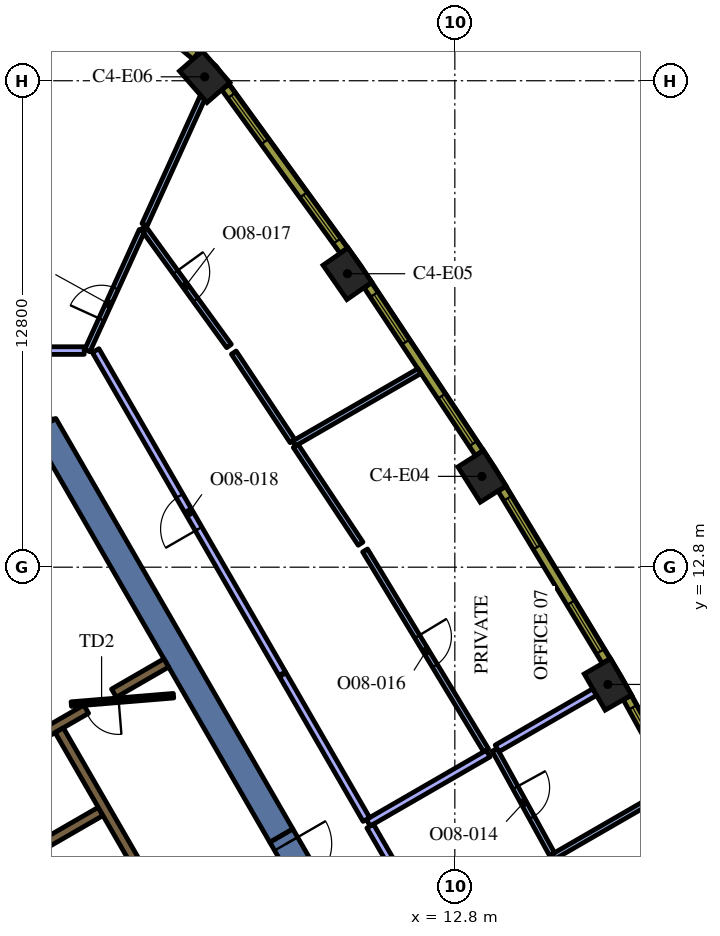
"""IFC4 building model, lengths in metres.
Left out: names, types, materials, properties, quantities, classifications, styles, units other than length and angle.
Written with IfcOpenShell. Run it as: python <this file> out.ifc"""

import sys

from ifc_helpers import new_model, si_unit, direction, frame, frame_2d, origin, origin_2d, place, context, subcontext, project, spatial, polyline, rectangle, outline, extrude, element, fill, save


model = new_model("IFC4")
c1 = context("Model", 3, precision=1e-05, world=origin(), true_north=direction((0.0, 1.0)))
c2 = subcontext(c1, "Body", "Model", "MODEL_VIEW")
j1 = project(units=[si_unit("LENGTHUNIT", "METRE"), si_unit("PLANEANGLEUNIT", "RADIAN")], contexts=[c1])
p1 = place(None, origin())
s1 = spatial("IfcSite", under=j1, at=p1, CompositionType="ELEMENT")
p2 = place(p1, origin())
s2 = spatial("IfcBuilding", under=s1, at=p2, CompositionType="ELEMENT")
p3 = place(p2, frame((0.0, 0.0, 235.2)))
s3 = spatial("IfcBuildingStorey", under=s2, at=p3, CompositionType="ELEMENT", Elevation=235.2)
for number, where, z_axis, x_axis in (
    (1, (16.827, 9.715, 0.0), (0.0, 0.0, 1.0), (-0.5, 0.866, 0.0)),
    (2, (13.513, 15.19, 0.0), (0.0, 0.0, 1.0), (-0.536, 0.845, 0.0)),
    (3, (9.975, 20.522, 0.0), (0.0, 0.0, 1.0), (-0.57, 0.822, 0.0)),
    (4, (6.219, 25.703, 0.0), (0.0, 0.0, 1.0), (-0.657, 0.754, 0.0)),
):
    element("IfcColumn", number, at=place(p3, frame(where, z_axis=z_axis, x_axis=x_axis)), inside=s3, PredefinedType="COLUMN", context=c2, shape_type="SweptSolid", body=[
        extrude(rectangle(XDim=1.1, YDim=0.8, at=origin_2d()), origin(), (0.0, 0.0, 1.0), 4.2),
    ])
p4 = place(p3, frame((8.235, 5.736, 0.0), z_axis=(0.0, 0.0, 1.0), x_axis=(-0.499983401189, 0.8660349869, 0.0)))
e5 = element("IfcWall", 5, at=p4, inside=s3, PredefinedType="SOLIDWALL", context=c2, shape_type="SweptSolid", body=[
    extrude(rectangle(XDim=12.472, YDim=0.7, at=frame_2d((6.236, 0.0))), origin(), (0.0, 0.0, 1.0), 4.2),
])
p5 = place(p3, origin())
e6 = element("IfcWall", 6, at=p5, inside=s3, PredefinedType="SOLIDWALL", context=c2, shape_type="SweptSolid", body=[
    extrude(outline(polyline([(1.501, 16.7), (2.277, 16.7), (1.695, 16.364), (1.501, 16.7)])), origin(), (0.0, 0.0, 1.0), 4.2),
])
p6 = place(p3, frame((6.568, -3.627, 0.0), z_axis=(0.0, 0.0, 1.0), x_axis=(-0.499999455981, 0.866025717874, 0.0)))
e7 = element("IfcWall", 7, at=p6, inside=s3, PredefinedType="SOLIDWALL", context=c2, shape_type="SweptSolid", body=[
    extrude(rectangle(XDim=11.978, YDim=0.25, at=frame_2d((5.989, 0.0))), origin(), (0.0, 0.0, 1.0), 4.2),
])
p7 = place(p3, frame((3.1, 9.064, 0.0), z_axis=(0.0, 0.0, 1.0), x_axis=(-0.866030133475, -0.499991807846, 0.0)))
e8 = element("IfcWall", 8, at=p7, inside=s3, PredefinedType="SOLIDWALL", context=c2, shape_type="SweptSolid", body=[
    extrude(rectangle(XDim=3.217, YDim=0.25, at=frame_2d((1.608, 0.0))), origin(), (0.0, 0.0, 1.0), 4.2),
])
p8 = place(p3, frame((1.574, 5.274, 0.0), z_axis=(0.0, 0.0, 1.0), x_axis=(0.866028486751, 0.499994660107, 0.0)))
e9 = element("IfcWall", 9, at=p8, inside=s3, PredefinedType="SOLIDWALL", context=c2, shape_type="SweptSolid", body=[
    extrude(rectangle(XDim=2.2, YDim=0.25, at=frame_2d((1.1, 0.0))), origin(), (0.0, 0.0, 1.0), 4.2),
])
p9 = place(p3, frame((3.83, 9.486, 0.0), z_axis=(0.0, 0.0, 1.0), x_axis=(0.865986202621, 0.500067892261, 0.0)))
e10 = element("IfcWall", 10, at=p9, inside=s3, PredefinedType="SOLIDWALL", context=c2, shape_type="SweptSolid", body=[
    extrude(rectangle(XDim=1.591, YDim=0.25, at=frame_2d((0.795, 0.0))), origin(), (0.0, 0.0, 1.0), 4.2),
])
p10 = place(p3, frame((8.565, -2.185, 0.0), z_axis=(0.0, 0.0, 1.0), x_axis=(-0.499997954832, 0.866026584559, 0.0)))
e11 = element("IfcWall", 11, at=p10, inside=s3, PredefinedType="SOLIDWALL", context=c2, shape_type="SweptSolid", body=[
    extrude(rectangle(XDim=12.35, YDim=0.25, at=frame_2d((6.175, 0.0))), origin(), (0.0, 0.0, 1.0), 4.2),
])
p11 = place(p10, frame((0.585, 0.0, 0.0)))
e12 = element("IfcOpeningElement", 12, at=p11, cuts=e11, PredefinedType="OPENING", context=c2, shape_type="SweptSolid", body=[
    extrude(rectangle(XDim=1.1, YDim=2.1, at=frame_2d((0.55, 1.05))), frame((0.0, 0.135, 0.0), z_axis=(0.0, -1.0, 0.0), x_axis=(1.0, 0.0, 0.0)), (0.0, 0.0, 1.0), 0.27),
])
p12 = place(p3, frame((5.398, 9.419, 0.0), z_axis=(0.0, 0.0, 1.0), x_axis=(-0.996653416376, -0.081743303248, 0.0)))
e13 = element("IfcWall", 13, at=p12, inside=s3, PredefinedType="PARTITIONING", context=c2, shape_type="SweptSolid", body=[
    extrude(rectangle(XDim=2.7, YDim=0.12, at=frame_2d((1.35, 0.0))), origin(), (0.0, 0.0, 1.0), 3.45),
])
p13 = place(p12, frame((1.45, 0.0, 0.0)))
e14 = element("IfcOpeningElement", 14, at=p13, cuts=e13, PredefinedType="OPENING", context=c2, shape_type="SweptSolid", body=[
    extrude(rectangle(XDim=0.9, YDim=2.1, at=frame_2d((0.45, 1.05))), frame((0.0, 0.07, 0.0), z_axis=(0.0, -1.0, 0.0), x_axis=(1.0, 0.0, 0.0)), (0.0, 0.0, 1.0), 0.14),
])
p14 = place(p3, frame((8.235, 5.736, 0.0), z_axis=(0.0, 0.0, 1.0), x_axis=(0.499954529098, -0.86605165483, 0.0)))
e15 = element("IfcWall", 15, at=p14, inside=s3, PredefinedType="SOLIDWALL", context=c2, shape_type="SweptSolid", body=[
    extrude(rectangle(XDim=1.7, YDim=0.7, at=frame_2d((0.85, 0.0))), origin(), (0.0, 0.0, 1.0), 4.2),
])
p15 = place(p14, frame((0.25, 0.0, 0.0)))
e16 = element("IfcOpeningElement", 16, at=p15, cuts=e15, PredefinedType="OPENING", context=c2, shape_type="SweptSolid", body=[
    extrude(rectangle(XDim=1.2, YDim=2.1, at=frame_2d((0.6, 1.05))), frame((0.0, 0.36, 0.0), z_axis=(0.0, -1.0, 0.0), x_axis=(1.0, 0.0, 0.0)), (0.0, 0.0, 1.0), 0.72),
])
p16 = place(p3, frame((15.394, 5.183, 0.0), z_axis=(0.0, 0.0, 1.0), x_axis=(0.866039935929, 0.499974828743, 0.0)))
e17 = element("IfcWall", 17, at=p16, inside=s3, PredefinedType="PARTITIONING", context=c2, shape_type="SweptSolid", body=[
    extrude(rectangle(XDim=3.601, YDim=0.15, at=frame_2d((1.8, 0.0))), origin(), (0.0, 0.0, 1.0), 3.45),
])
p17 = place(p3, frame((13.848, 7.995, 0.0), z_axis=(0.0, 0.0, 1.0), x_axis=(0.481894826099, -0.876229066272, 0.0)))
e18 = element("IfcWall", 18, at=p17, inside=s3, PredefinedType="PARTITIONING", context=c2, shape_type="SweptSolid", body=[
    extrude(rectangle(XDim=3.134, YDim=0.15, at=frame_2d((1.567, 0.0))), origin(), (0.0, 0.0, 1.0), 3.45),
])
p18 = place(p17, frame((1.134, 0.0, 0.0)))
e19 = element("IfcOpeningElement", 19, at=p18, cuts=e18, PredefinedType="OPENING", context=c2, shape_type="SweptSolid", body=[
    extrude(rectangle(XDim=0.9, YDim=2.1, at=frame_2d((0.45, 1.05))), frame((0.0, 0.085, 0.0), z_axis=(0.0, -1.0, 0.0), x_axis=(1.0, 0.0, 0.0)), (0.0, 0.0, 1.0), 0.17),
])
p19 = place(p3, frame((13.913, 8.032, 0.0), z_axis=(0.0, 0.0, 1.0), x_axis=(0.866015594979, 0.500016988964, 0.0)))
e20 = element("IfcWall", 20, at=p19, inside=s3, PredefinedType="PARTITIONING", context=c2, shape_type="SweptSolid", body=[
    extrude(rectangle(XDim=2.966, YDim=0.2, at=frame_2d((1.483, 0.0))), origin(), (0.0, 0.0, 1.0), 3.45),
])
p20 = place(p3, frame((10.522, 6.075, 0.0), z_axis=(0.0, 0.0, 1.0), x_axis=(0.866003708037, 0.500037576254, 0.0)))
e21 = element("IfcWall", 21, at=p20, inside=s3, PredefinedType="PARTITIONING", context=c2, shape_type="SweptSolid", body=[
    extrude(rectangle(XDim=3.644, YDim=0.2, at=frame_2d((1.822, 0.0))), origin(), (0.0, 0.0, 1.0), 3.45),
])
p21 = place(p3, frame((12.772, 2.178, 0.0), z_axis=(0.0, 0.0, 1.0), x_axis=(-0.50001224981, 0.866018331238, 0.0)))
e22 = element("IfcWall", 22, at=p21, inside=s3, PredefinedType="PARTITIONING", context=c2, shape_type="SweptSolid", body=[
    extrude(rectangle(XDim=4.4, YDim=0.2, at=frame_2d((2.2, 0.0))), origin(), (0.0, 0.0, 1.0), 3.45),
])
p22 = place(p3, frame((8.57, 16.056, 0.0), z_axis=(0.0, 0.0, 1.0), x_axis=(0.866000839906, 0.500042543472, 0.0)))
e23 = element("IfcWall", 23, at=p22, inside=s3, PredefinedType="PARTITIONING", context=c2, shape_type="SweptSolid", body=[
    extrude(rectangle(XDim=3.807, YDim=0.15, at=frame_2d((1.904, 0.0))), origin(), (0.0, 0.0, 1.0), 3.45),
])
p23 = place(p3, frame((10.439, 13.24, 0.0), z_axis=(0.0, 0.0, 1.0), x_axis=(0.517837859082, -0.855478785068, 0.0)))
e24 = element("IfcWall", 24, at=p23, inside=s3, PredefinedType="PARTITIONING", context=c2, shape_type="SweptSolid", body=[
    extrude(rectangle(XDim=6.148, YDim=0.15, at=frame_2d((3.074, 0.0))), origin(), (0.0, 0.0, 1.0), 3.45),
])
p24 = place(p23, frame((2.648, 0.0, 0.0)))
e25 = element("IfcOpeningElement", 25, at=p24, cuts=e24, PredefinedType="OPENING", context=c2, shape_type="SweptSolid", body=[
    extrude(rectangle(XDim=0.9, YDim=2.1, at=frame_2d((0.45, 1.05))), frame((0.0, 0.085, 0.0), z_axis=(0.0, -1.0, 0.0), x_axis=(1.0, 0.0, 0.0)), (0.0, 0.0, 1.0), 0.17),
])
p25 = place(p3, frame((10.32, 13.419, 0.0), z_axis=(0.0, 0.0, 1.0), x_axis=(-0.552857215969, 0.833276003945, 0.0)))
e26 = element("IfcWall", 26, at=p25, inside=s3, PredefinedType="PARTITIONING", context=c2, shape_type="SweptSolid", body=[
    extrude(rectangle(XDim=3.09, YDim=0.15, at=frame_2d((1.545, 0.0))), origin(), (0.0, 0.0, 1.0), 3.45),
])
p26 = place(p3, frame((8.529, 16.118, 0.0), z_axis=(0.0, 0.0, 1.0), x_axis=(-0.552884246744, 0.833258069089, 0.0)))
e27 = element("IfcWall", 27, at=p26, inside=s3, PredefinedType="PARTITIONING", context=c2, shape_type="SweptSolid", body=[
    extrude(rectangle(XDim=2.794, YDim=0.15, at=frame_2d((1.397, 0.0))), origin(), (0.0, 0.0, 1.0), 3.45),
])
p27 = place(p3, frame((4.601, 21.733, 0.0), z_axis=(0.0, 0.0, 1.0), x_axis=(0.587031033917, -0.809564429319, 0.0)))
e28 = element("IfcWall", 28, at=p27, inside=s3, PredefinedType="PARTITIONING", context=c2, shape_type="SweptSolid", body=[
    extrude(rectangle(XDim=3.845, YDim=0.15, at=frame_2d((1.923, 0.0))), origin(), (0.0, 0.0, 1.0), 3.45),
])
p28 = place(p27, frame((1.445, 0.0, 0.0)))
e29 = element("IfcOpeningElement", 29, at=p28, cuts=e28, PredefinedType="OPENING", context=c2, shape_type="SweptSolid", body=[
    extrude(rectangle(XDim=0.9, YDim=2.1, at=frame_2d((0.45, 1.05))), frame((0.0, 0.085, 0.0), z_axis=(0.0, -1.0, 0.0), x_axis=(1.0, 0.0, 0.0)), (0.0, 0.0, 1.0), 0.17),
])
p29 = place(p3, frame((4.636, 21.812, 0.0), z_axis=(0.0, 0.0, 1.0), x_axis=(0.414322811892, 0.910129994861, 0.0)))
e30 = element("IfcWall", 30, at=p29, inside=s3, PredefinedType="PARTITIONING", context=c2, shape_type="SweptSolid", body=[
    extrude(rectangle(XDim=3.679, YDim=0.15, at=frame_2d((1.84, 0.0))), origin(), (0.0, 0.0, 1.0), 3.45),
])
p30 = place(p3, frame((3.129, 18.5, 0.0), z_axis=(0.0, 0.0, 1.0), x_axis=(0.414291096557, 0.910144432117, 0.0)))
e31 = element("IfcWall", 31, at=p30, inside=s3, PredefinedType="PARTITIONING", context=c2, shape_type="SweptSolid", body=[
    extrude(rectangle(XDim=3.466, YDim=0.15, at=frame_2d((1.733, 0.0))), origin(), (0.0, 0.0, 1.0), 3.45),
])
p31 = place(p30, frame((0.9, 0.0, 0.0)))
e32 = element("IfcOpeningElement", 32, at=p31, cuts=e31, PredefinedType="OPENING", context=c2, shape_type="SweptSolid", body=[
    extrude(rectangle(XDim=0.9, YDim=2.1, at=frame_2d((0.45, 1.05))), frame((0.0, 0.085, 0.0), z_axis=(0.0, -1.0, 0.0), x_axis=(1.0, 0.0, 0.0)), (0.0, 0.0, 1.0), 0.17),
])
p32 = place(p3, frame((10.472, 6.162, 0.0), z_axis=(0.0, 0.0, 1.0), x_axis=(-0.499988222896, 0.866032203192, 0.0)))
e33 = element("IfcWall", 33, at=p32, inside=s3, PredefinedType="PARTITIONING", context=c2, shape_type="SweptSolid", body=[
    extrude(rectangle(XDim=4.4, YDim=0.2, at=frame_2d((2.2, 0.0))), origin(), (0.0, 0.0, 1.0), 3.45),
])
p33 = place(p3, frame((8.257, 9.998, 0.0), z_axis=(0.0, 0.0, 1.0), x_axis=(-0.499987955211, 0.866032357735, 0.0)))
e34 = element("IfcWall", 34, at=p33, inside=s3, PredefinedType="PARTITIONING", context=c2, shape_type="SweptSolid", body=[
    extrude(rectangle(XDim=9.817, YDim=0.2, at=frame_2d((4.909, 0.0))), origin(), (0.0, 0.0, 1.0), 3.45),
])
p34 = place(p33, frame((4.4, 0.0, 0.0)))
e35 = element("IfcOpeningElement", 35, at=p34, cuts=e34, PredefinedType="OPENING", context=c2, shape_type="SweptSolid", body=[
    extrude(rectangle(XDim=1.0, YDim=2.1, at=frame_2d((0.5, 1.05))), frame((0.0, 0.11, 0.0), z_axis=(0.0, -1.0, 0.0), x_axis=(1.0, 0.0, 0.0)), (0.0, 0.0, 1.0), 0.22),
])
p35 = place(p3, frame((3.046, 18.5, 0.0), z_axis=(0.0, 0.0, 1.0), x_axis=(-1.0, 0.0, 0.0)))
e36 = element("IfcWall", 36, at=p35, inside=s3, PredefinedType="PARTITIONING", context=c2, shape_type="SweptSolid", body=[
    extrude(rectangle(XDim=6.065, YDim=0.2, at=frame_2d((3.033, 0.0))), origin(), (0.0, 0.0, 1.0), 3.45),
])
p36 = place(p3, frame((19.892, 4.725, 0.0), z_axis=(0.0, 0.0, 1.0), x_axis=(-0.481925825015, 0.876212017256, 0.0)))
e37 = element("IfcWall", 37, at=p36, inside=s3, PredefinedType="SOLIDWALL", context=c2, shape_type="SweptSolid", body=[
    extrude(rectangle(XDim=5.299, YDim=0.24, at=frame_2d((2.649, 0.0))), origin(), (0.0, 0.0, 1.0), 3.95),
])
p37 = place(p36, frame((0.295, 0.0, 0.9)))
e38 = element("IfcOpeningElement", 38, at=p37, cuts=e37, PredefinedType="OPENING", context=c2, shape_type="SweptSolid", body=[
    extrude(rectangle(XDim=1.5, YDim=2.55, at=frame_2d((0.75, 1.275))), frame((0.0, 0.13, 0.0), z_axis=(0.0, -1.0, 0.0), x_axis=(1.0, 0.0, 0.0)), (0.0, 0.0, 1.0), 0.26),
])
p38 = place(p36, frame((3.504, 0.0, 0.9)))
e39 = element("IfcOpeningElement", 39, at=p38, cuts=e37, PredefinedType="OPENING", context=c2, shape_type="SweptSolid", body=[
    extrude(rectangle(XDim=1.5, YDim=2.55, at=frame_2d((0.75, 1.275))), frame((0.0, 0.13, 0.0), z_axis=(0.0, -1.0, 0.0), x_axis=(1.0, 0.0, 0.0)), (0.0, 0.0, 1.0), 0.26),
])
p39 = place(p3, frame((16.782, 10.331, 0.0), z_axis=(0.0, 0.0, 1.0), x_axis=(-0.517846166225, 0.855473756538, 0.0)))
e40 = element("IfcWall", 40, at=p39, inside=s3, PredefinedType="SOLIDWALL", context=c2, shape_type="SweptSolid", body=[
    extrude(rectangle(XDim=5.298, YDim=0.24, at=frame_2d((2.649, 0.0))), origin(), (0.0, 0.0, 1.0), 3.95),
])
p40 = place(p39, frame((0.294, 0.0, 0.9)))
e41 = element("IfcOpeningElement", 41, at=p40, cuts=e40, PredefinedType="OPENING", context=c2, shape_type="SweptSolid", body=[
    extrude(rectangle(XDim=1.5, YDim=2.55, at=frame_2d((0.75, 1.275))), frame((0.0, 0.13, 0.0), z_axis=(0.0, -1.0, 0.0), x_axis=(1.0, 0.0, 0.0)), (0.0, 0.0, 1.0), 0.26),
])
p41 = place(p39, frame((3.504, 0.0, 0.9)))
e42 = element("IfcOpeningElement", 42, at=p41, cuts=e40, PredefinedType="OPENING", context=c2, shape_type="SweptSolid", body=[
    extrude(rectangle(XDim=1.5, YDim=2.55, at=frame_2d((0.75, 1.275))), frame((0.0, 0.13, 0.0), z_axis=(0.0, -1.0, 0.0), x_axis=(1.0, 0.0, 0.0)), (0.0, 0.0, 1.0), 0.26),
])
p42 = place(p3, frame((13.442, 15.803, 0.0), z_axis=(0.0, 0.0, 1.0), x_axis=(-0.552901821755, 0.833246407433, 0.0)))
e43 = element("IfcWall", 43, at=p42, inside=s3, PredefinedType="SOLIDWALL", context=c2, shape_type="SweptSolid", body=[
    extrude(rectangle(XDim=5.298, YDim=0.24, at=frame_2d((2.649, 0.0))), origin(), (0.0, 0.0, 1.0), 3.95),
])
p43 = place(p42, frame((0.295, 0.0, 0.9)))
e44 = element("IfcOpeningElement", 44, at=p43, cuts=e43, PredefinedType="OPENING", context=c2, shape_type="SweptSolid", body=[
    extrude(rectangle(XDim=1.5, YDim=2.55, at=frame_2d((0.75, 1.275))), frame((0.0, 0.13, 0.0), z_axis=(0.0, -1.0, 0.0), x_axis=(1.0, 0.0, 0.0)), (0.0, 0.0, 1.0), 0.26),
])
p44 = place(p42, frame((3.504, 0.0, 0.9)))
e45 = element("IfcOpeningElement", 45, at=p44, cuts=e43, PredefinedType="OPENING", context=c2, shape_type="SweptSolid", body=[
    extrude(rectangle(XDim=1.5, YDim=2.55, at=frame_2d((0.75, 1.275))), frame((0.0, 0.13, 0.0), z_axis=(0.0, -1.0, 0.0), x_axis=(1.0, 0.0, 0.0)), (0.0, 0.0, 1.0), 0.26),
])
p45 = place(p3, frame((9.878, 21.132, 0.0), z_axis=(0.0, 0.0, 1.0), x_axis=(-0.586998456641, 0.80958805074, 0.0)))
e46 = element("IfcWall", 46, at=p45, inside=s3, PredefinedType="SOLIDWALL", context=c2, shape_type="SweptSolid", body=[
    extrude(rectangle(XDim=5.311, YDim=0.24, at=frame_2d((2.655, 0.0))), origin(), (0.0, 0.0, 1.0), 3.95),
])
p46 = place(p45, frame((0.306, 0.0, 0.9)))
e47 = element("IfcOpeningElement", 47, at=p46, cuts=e46, PredefinedType="OPENING", context=c2, shape_type="SweptSolid", body=[
    extrude(rectangle(XDim=1.5, YDim=2.55, at=frame_2d((0.75, 1.275))), frame((0.0, 0.13, 0.0), z_axis=(0.0, -1.0, 0.0), x_axis=(1.0, 0.0, 0.0)), (0.0, 0.0, 1.0), 0.26),
])
p47 = place(p45, frame((3.539, 0.0, 0.9)))
e48 = element("IfcOpeningElement", 48, at=p47, cuts=e46, PredefinedType="OPENING", context=c2, shape_type="SweptSolid", body=[
    extrude(rectangle(XDim=1.5, YDim=2.55, at=frame_2d((0.75, 1.275))), frame((0.0, 0.13, 0.0), z_axis=(0.0, -1.0, 0.0), x_axis=(1.0, 0.0, 0.0)), (0.0, 0.0, 1.0), 0.26),
])
p48 = place(p3, frame((5.987, 26.259, 0.0), z_axis=(0.0, 0.0, 1.0), x_axis=(-0.769990037733, 0.638055908045, 0.0)))
e49 = element("IfcWall", 49, at=p48, inside=s3, PredefinedType="SOLIDWALL", context=c2, shape_type="SweptSolid", body=[
    extrude(rectangle(XDim=2.609, YDim=0.24, at=frame_2d((1.305, 0.0))), origin(), (0.0, 0.0, 1.0), 3.95),
])
p49 = place(p48, frame((0.805, 0.0, 0.9)))
e50 = element("IfcOpeningElement", 50, at=p49, cuts=e49, PredefinedType="OPENING", context=c2, shape_type="SweptSolid", body=[
    extrude(rectangle(XDim=1.0, YDim=2.55, at=frame_2d((0.5, 1.275))), frame((0.0, 0.13, 0.0), z_axis=(0.0, -1.0, 0.0), x_axis=(1.0, 0.0, 0.0)), (0.0, 0.0, 1.0), 0.26),
])
p50 = place(p13, origin())
e51 = element("IfcDoor", 51, at=p50, inside=s3, OperationType="SINGLE_SWING_LEFT", PredefinedType="DOOR", context=c2, shape_type="SweptSolid", body=[
    extrude(rectangle(XDim=0.9, YDim=2.1, at=frame_2d((0.45, 1.05))), frame((0.0, 0.025, 0.0), z_axis=(0.0, -1.0, 0.0), x_axis=(1.0, 0.0, 0.0)), (0.0, 0.0, 1.0), 0.05),
])
fill(e14, e51)
p51 = place(p15, origin())
e52 = element("IfcDoor", 52, at=p51, inside=s3, OperationType="SINGLE_SWING_LEFT", PredefinedType="DOOR", context=c2, shape_type="SweptSolid", body=[
    extrude(rectangle(XDim=1.2, YDim=2.1, at=frame_2d((0.6, 1.05))), frame((0.0, 0.025, 0.0), z_axis=(0.0, -1.0, 0.0), x_axis=(1.0, 0.0, 0.0)), (0.0, 0.0, 1.0), 0.05),
])
fill(e16, e52)
p52 = place(p18, origin())
e53 = element("IfcDoor", 53, at=p52, inside=s3, OperationType="SINGLE_SWING_RIGHT", PredefinedType="DOOR", context=c2, shape_type="SweptSolid", body=[
    extrude(rectangle(XDim=0.9, YDim=2.1, at=frame_2d((0.45, 1.05))), frame((0.0, 0.025, 0.0), z_axis=(0.0, -1.0, 0.0), x_axis=(1.0, 0.0, 0.0)), (0.0, 0.0, 1.0), 0.05),
])
fill(e19, e53)
p53 = place(p24, origin())
e54 = element("IfcDoor", 54, at=p53, inside=s3, OperationType="SINGLE_SWING_RIGHT", PredefinedType="DOOR", context=c2, shape_type="SweptSolid", body=[
    extrude(rectangle(XDim=0.9, YDim=2.1, at=frame_2d((0.45, 1.05))), frame((0.0, 0.025, 0.0), z_axis=(0.0, -1.0, 0.0), x_axis=(1.0, 0.0, 0.0)), (0.0, 0.0, 1.0), 0.05),
])
fill(e25, e54)
p54 = place(p28, origin())
e55 = element("IfcDoor", 55, at=p54, inside=s3, OperationType="SINGLE_SWING_LEFT", PredefinedType="DOOR", context=c2, shape_type="SweptSolid", body=[
    extrude(rectangle(XDim=0.9, YDim=2.1, at=frame_2d((0.45, 1.05))), frame((0.0, 0.025, 0.0), z_axis=(0.0, -1.0, 0.0), x_axis=(1.0, 0.0, 0.0)), (0.0, 0.0, 1.0), 0.05),
])
fill(e29, e55)
p55 = place(p34, origin())
e56 = element("IfcDoor", 56, at=p55, inside=s3, OperationType="SINGLE_SWING_LEFT", PredefinedType="DOOR", context=c2, shape_type="SweptSolid", body=[
    extrude(rectangle(XDim=1.0, YDim=2.1, at=frame_2d((0.5, 1.05))), frame((0.0, 0.025, 0.0), z_axis=(0.0, -1.0, 0.0), x_axis=(1.0, 0.0, 0.0)), (0.0, 0.0, 1.0), 0.05),
])
fill(e35, e56)
p56 = place(p31, origin())
e57 = element("IfcDoor", 57, at=p56, inside=s3, OperationType="SINGLE_SWING_LEFT", PredefinedType="DOOR", context=c2, shape_type="SweptSolid", body=[
    extrude(rectangle(XDim=0.9, YDim=2.1, at=frame_2d((0.45, 1.05))), frame((0.0, 0.025, 0.0), z_axis=(0.0, -1.0, 0.0), x_axis=(1.0, 0.0, 0.0)), (0.0, 0.0, 1.0), 0.05),
])
fill(e32, e57)
p57 = place(p38, origin())
e58 = element("IfcWindow", 58, at=p57, inside=s3, PartitioningType="SINGLE_PANEL", PredefinedType="WINDOW", context=c2, shape_type="SweptSolid", body=[
    extrude(rectangle(XDim=1.5, YDim=2.55, at=frame_2d((0.75, 1.275))), frame((0.0, 0.04, 0.0), z_axis=(0.0, -1.0, 0.0), x_axis=(1.0, 0.0, 0.0)), (0.0, 0.0, 1.0), 0.06),
])
fill(e39, e58)
p58 = place(p40, origin())
e59 = element("IfcWindow", 59, at=p58, inside=s3, PartitioningType="SINGLE_PANEL", PredefinedType="WINDOW", context=c2, shape_type="SweptSolid", body=[
    extrude(rectangle(XDim=1.5, YDim=2.55, at=frame_2d((0.75, 1.275))), frame((0.0, 0.04, 0.0), z_axis=(0.0, -1.0, 0.0), x_axis=(1.0, 0.0, 0.0)), (0.0, 0.0, 1.0), 0.06),
])
fill(e41, e59)
p59 = place(p41, origin())
e60 = element("IfcWindow", 60, at=p59, inside=s3, PartitioningType="SINGLE_PANEL", PredefinedType="WINDOW", context=c2, shape_type="SweptSolid", body=[
    extrude(rectangle(XDim=1.5, YDim=2.55, at=frame_2d((0.75, 1.275))), frame((0.0, 0.04, 0.0), z_axis=(0.0, -1.0, 0.0), x_axis=(1.0, 0.0, 0.0)), (0.0, 0.0, 1.0), 0.06),
])
fill(e42, e60)
p60 = place(p43, origin())
e61 = element("IfcWindow", 61, at=p60, inside=s3, PartitioningType="SINGLE_PANEL", PredefinedType="WINDOW", context=c2, shape_type="SweptSolid", body=[
    extrude(rectangle(XDim=1.5, YDim=2.55, at=frame_2d((0.75, 1.275))), frame((0.0, 0.04, 0.0), z_axis=(0.0, -1.0, 0.0), x_axis=(1.0, 0.0, 0.0)), (0.0, 0.0, 1.0), 0.06),
])
fill(e44, e61)
p61 = place(p44, origin())
e62 = element("IfcWindow", 62, at=p61, inside=s3, PartitioningType="SINGLE_PANEL", PredefinedType="WINDOW", context=c2, shape_type="SweptSolid", body=[
    extrude(rectangle(XDim=1.5, YDim=2.55, at=frame_2d((0.75, 1.275))), frame((0.0, 0.04, 0.0), z_axis=(0.0, -1.0, 0.0), x_axis=(1.0, 0.0, 0.0)), (0.0, 0.0, 1.0), 0.06),
])
fill(e45, e62)
p62 = place(p46, origin())
e63 = element("IfcWindow", 63, at=p62, inside=s3, PartitioningType="SINGLE_PANEL", PredefinedType="WINDOW", context=c2, shape_type="SweptSolid", body=[
    extrude(rectangle(XDim=1.5, YDim=2.55, at=frame_2d((0.75, 1.275))), frame((0.0, 0.04, 0.0), z_axis=(0.0, -1.0, 0.0), x_axis=(1.0, 0.0, 0.0)), (0.0, 0.0, 1.0), 0.06),
])
fill(e47, e63)
p63 = place(p47, origin())
e64 = element("IfcWindow", 64, at=p63, inside=s3, PartitioningType="SINGLE_PANEL", PredefinedType="WINDOW", context=c2, shape_type="SweptSolid", body=[
    extrude(rectangle(XDim=1.5, YDim=2.55, at=frame_2d((0.75, 1.275))), frame((0.0, 0.04, 0.0), z_axis=(0.0, -1.0, 0.0), x_axis=(1.0, 0.0, 0.0)), (0.0, 0.0, 1.0), 0.06),
])
fill(e48, e64)
save(model, sys.argv[1])
